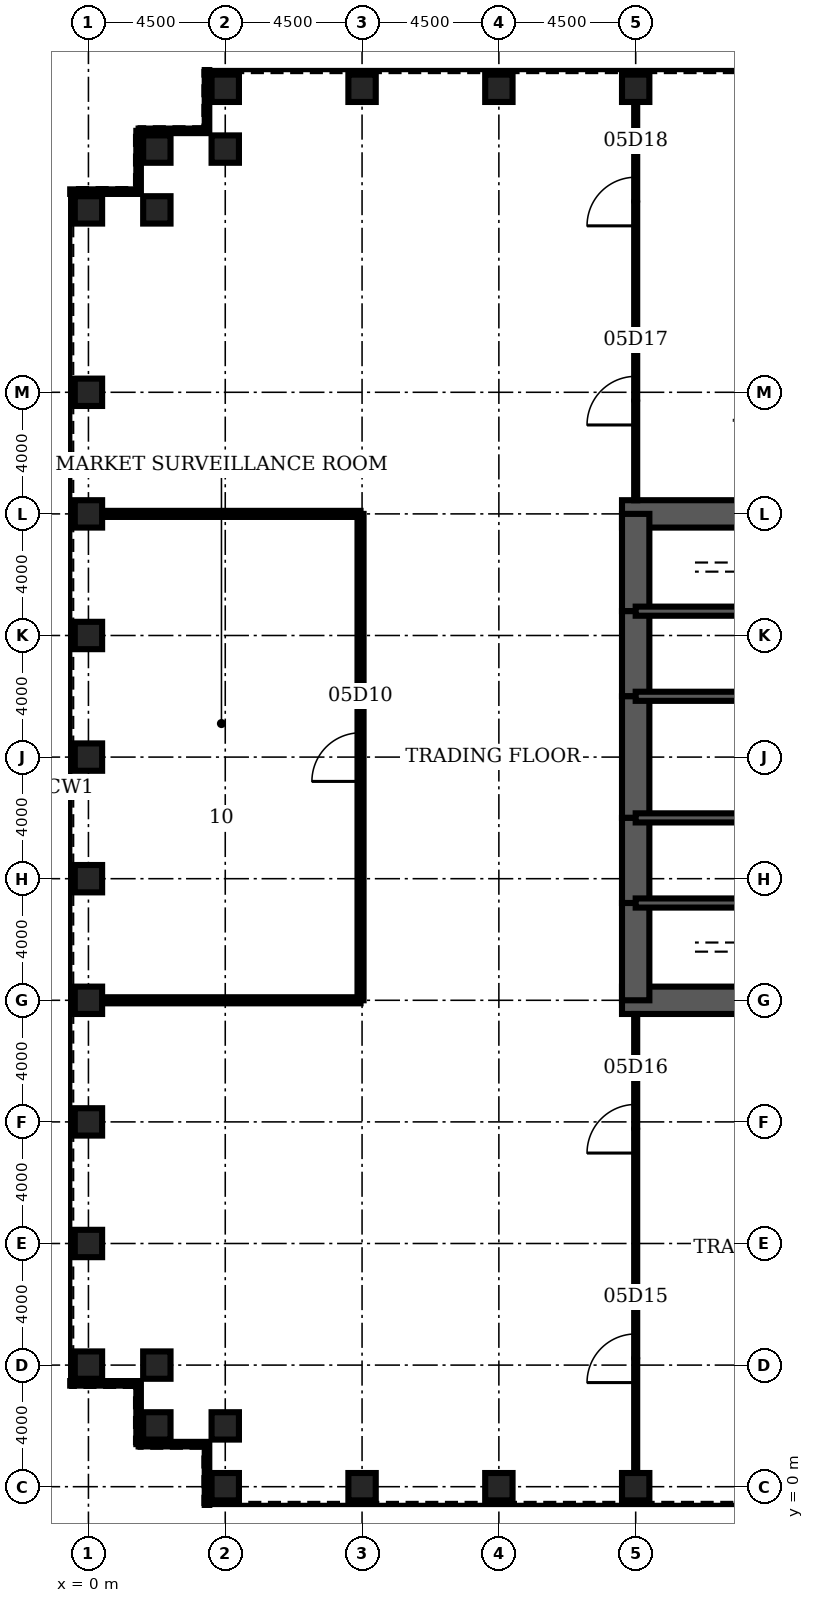
"""IFC4 building model, lengths in metres.
Left out: names, types, materials, properties, quantities, classifications, styles, units other than length and angle.
Written with IfcOpenShell. Run it as: python <this file> out.ifc"""

import sys

from ifc_helpers import new_model, si_unit, direction, frame, frame_2d, origin, origin_2d, place, context, subcontext, project, spatial, rectangle, hollow_rectangle, extrude, element, fill, save


model = new_model("IFC4")
c1 = context("Model", 3, precision=1e-05, world=origin(), true_north=direction((0.0, 1.0)))
c2 = subcontext(c1, "Body", "Model", "MODEL_VIEW")
j1 = project(units=[si_unit("LENGTHUNIT", "METRE"), si_unit("PLANEANGLEUNIT", "RADIAN")], contexts=[c1])
p1 = place(None, origin())
s1 = spatial("IfcSite", under=j1, at=p1, CompositionType="ELEMENT")
p2 = place(p1, origin())
s2 = spatial("IfcBuilding", under=s1, at=p2, CompositionType="ELEMENT")
p3 = place(p2, frame((0.0, 0.0, 27.5)))
s3 = spatial("IfcBuildingStorey", under=s2, at=p3, CompositionType="ELEMENT", Elevation=27.5)
for number, where, z_axis, x_axis in (
    (1, (4.5, 0.0, 0.0), (0.0, 0.0, 1.0), (0.0, 1.0, 0.0)),
    (2, (9.0, 0.0, 0.0), (0.0, 0.0, 1.0), (0.0, 1.0, 0.0)),
    (3, (13.5, 0.0, 0.0), (0.0, 0.0, 1.0), (0.0, 1.0, 0.0)),
    (4, (18.0, 0.0, 0.0), (0.0, 0.0, 1.0), (0.0, 1.0, 0.0)),
    (5, (18.0, 46.0, 0.0), (0.0, 0.0, 1.0), (0.0, 1.0, 0.0)),
    (6, (13.5, 46.0, 0.0), (0.0, 0.0, 1.0), (0.0, 1.0, 0.0)),
    (7, (9.0, 46.0, 0.0), (0.0, 0.0, 1.0), (0.0, 1.0, 0.0)),
    (8, (4.5, 46.0, 0.0), (0.0, 0.0, 1.0), (0.0, 1.0, 0.0)),
    (9, (4.5, 44.0, 0.0), (0.0, 0.0, 1.0), (0.0, 1.0, 0.0)),
    (10, (2.25, 44.0, 0.0), (0.0, 0.0, 1.0), (1.0, 0.0, 0.0)),
    (11, (2.25, 42.0, 0.0), (0.0, 0.0, 1.0), (1.0, 0.0, 0.0)),
    (12, (0.0, 42.0, 0.0), (0.0, 0.0, 1.0), (1.0, 0.0, 0.0)),
    (13, (0.0, 36.0, 0.0), (0.0, 0.0, 1.0), (1.0, 0.0, 0.0)),
    (14, (0.0, 32.0, 0.0), (0.0, 0.0, 1.0), (1.0, 0.0, 0.0)),
    (15, (0.0, 28.0, 0.0), (0.0, 0.0, 1.0), (1.0, 0.0, 0.0)),
    (16, (0.0, 24.0, 0.0), (0.0, 0.0, 1.0), (1.0, 0.0, 0.0)),
    (17, (0.0, 20.0, 0.0), (0.0, 0.0, 1.0), (1.0, 0.0, 0.0)),
    (18, (0.0, 16.0, 0.0), (0.0, 0.0, 1.0), (1.0, 0.0, 0.0)),
    (19, (0.0, 12.0, 0.0), (0.0, 0.0, 1.0), (1.0, 0.0, 0.0)),
    (20, (0.0, 8.0, 0.0), (0.0, 0.0, 1.0), (1.0, 0.0, 0.0)),
    (21, (0.0, 4.0, 0.0), (0.0, 0.0, 1.0), (1.0, 0.0, 0.0)),
    (22, (2.25, 4.0, 0.0), (0.0, 0.0, 1.0), (1.0, 0.0, 0.0)),
    (23, (2.25, 2.0, 0.0), (0.0, 0.0, 1.0), (1.0, 0.0, 0.0)),
    (24, (4.5, 2.0, 0.0), (0.0, 0.0, 1.0), (0.0, 1.0, 0.0)),
):
    element("IfcColumn", number, at=place(p3, frame(where, z_axis=z_axis, x_axis=x_axis)), inside=s3, PredefinedType="COLUMN", context=c2, shape_type="SweptSolid", body=[
        extrude(hollow_rectangle(XDim=0.9, YDim=0.9, WallThickness=0.12, at=origin_2d()), origin(), (0.0, 0.0, 1.0), 4.5),
    ])
for number, where, z_axis, x_axis in (
    (25, (17.55, 16.0, 0.0), (0.0, 0.0, 1.0), (1.0, 0.0, 0.0)),
    (26, (27.0, 32.0, 0.0), (0.0, 0.0, 1.0), (-1.0, 0.0, 0.0)),
):
    element("IfcWall", number, at=place(p3, frame(where, z_axis=z_axis, x_axis=x_axis)), inside=s3, PredefinedType="SHEAR", context=c2, shape_type="SweptSolid", body=[
        extrude(rectangle(XDim=9.45, YDim=0.9, at=frame_2d((4.725, 0.0))), origin(), (0.0, 0.0, 1.0), 4.5),
    ])
p4 = place(p3, frame((18.0, 32.0, 0.0), z_axis=(0.0, 0.0, 1.0), x_axis=(0.0, -1.0, 0.0)))
e27 = element("IfcWall", 27, at=p4, inside=s3, PredefinedType="SHEAR", context=c2, shape_type="SweptSolid", body=[
    extrude(rectangle(XDim=3.2, YDim=0.9, at=frame_2d((1.6, 0.0))), origin(), (0.0, 0.0, 1.0), 4.5),
])
p5 = place(p3, frame((18.0, 28.8, 0.0), z_axis=(0.0, 0.0, 1.0), x_axis=(0.0, -1.0, 0.0)))
e28 = element("IfcWall", 28, at=p5, inside=s3, PredefinedType="SHEAR", context=c2, shape_type="SweptSolid", body=[
    extrude(rectangle(XDim=2.8, YDim=0.9, at=frame_2d((1.4, 0.0))), origin(), (0.0, 0.0, 1.0), 4.5),
])
p6 = place(p5, frame((0.4, 0.0, 0.0)))
e29 = element("IfcOpeningElement", 29, at=p6, cuts=e28, PredefinedType="OPENING", context=c2, shape_type="SweptSolid", body=[
    extrude(rectangle(XDim=1.8, YDim=2.1, at=frame_2d((0.9, 1.05))), frame((0.0, 0.46, 0.0), z_axis=(0.0, -1.0, 0.0), x_axis=(1.0, 0.0, 0.0)), (0.0, 0.0, 1.0), 0.92),
])
p7 = place(p3, frame((18.0, 26.0, 0.0), z_axis=(0.0, 0.0, 1.0), x_axis=(0.0, -1.0, 0.0)))
e30 = element("IfcWall", 30, at=p7, inside=s3, PredefinedType="SHEAR", context=c2, shape_type="SweptSolid", body=[
    extrude(rectangle(XDim=4.0, YDim=0.9, at=frame_2d((2.0, 0.0))), origin(), (0.0, 0.0, 1.0), 4.5),
])
p8 = place(p3, frame((18.0, 22.0, 0.0), z_axis=(0.0, 0.0, 1.0), x_axis=(0.0, -1.0, 0.0)))
e31 = element("IfcWall", 31, at=p8, inside=s3, PredefinedType="SHEAR", context=c2, shape_type="SweptSolid", body=[
    extrude(rectangle(XDim=2.8, YDim=0.9, at=frame_2d((1.4, 0.0))), origin(), (0.0, 0.0, 1.0), 4.5),
])
p9 = place(p8, frame((0.6, 0.0, 0.0)))
e32 = element("IfcOpeningElement", 32, at=p9, cuts=e31, PredefinedType="OPENING", context=c2, shape_type="SweptSolid", body=[
    extrude(rectangle(XDim=1.8, YDim=2.1, at=frame_2d((0.9, 1.05))), frame((0.0, 0.46, 0.0), z_axis=(0.0, -1.0, 0.0), x_axis=(1.0, 0.0, 0.0)), (0.0, 0.0, 1.0), 0.92),
])
p10 = place(p3, frame((18.0, 19.2, 0.0), z_axis=(0.0, 0.0, 1.0), x_axis=(0.0, -1.0, 0.0)))
e33 = element("IfcWall", 33, at=p10, inside=s3, PredefinedType="SHEAR", context=c2, shape_type="SweptSolid", body=[
    extrude(rectangle(XDim=3.2, YDim=0.9, at=frame_2d((1.6, 0.0))), origin(), (0.0, 0.0, 1.0), 4.5),
])
p11 = place(p3, frame((18.0, 19.2, 0.0), z_axis=(0.0, 0.0, 1.0), x_axis=(1.0, 0.0, 0.0)))
e34 = element("IfcWall", 34, at=p11, inside=s3, PredefinedType="SOLIDWALL", context=c2, shape_type="SweptSolid", body=[
    extrude(rectangle(XDim=9.0, YDim=0.3, at=frame_2d((4.5, 0.0))), origin(), (0.0, 0.0, 1.0), 4.5),
])
p12 = place(p11, frame((0.65, 0.0, 0.0)))
e35 = element("IfcOpeningElement", 35, at=p12, cuts=e34, PredefinedType="OPENING", context=c2, shape_type="SweptSolid", body=[
    extrude(rectangle(XDim=1.0, YDim=2.1, at=frame_2d((0.5, 1.05))), frame((0.0, 0.16, 0.0), z_axis=(0.0, -1.0, 0.0), x_axis=(1.0, 0.0, 0.0)), (0.0, 0.0, 1.0), 0.32),
])
p13 = place(p3, frame((18.0, 28.8, 0.0), z_axis=(0.0, 0.0, 1.0), x_axis=(1.0, 0.0, 0.0)))
e36 = element("IfcWall", 36, at=p13, inside=s3, PredefinedType="SOLIDWALL", context=c2, shape_type="SweptSolid", body=[
    extrude(rectangle(XDim=9.0, YDim=0.3, at=frame_2d((4.5, 0.0))), origin(), (0.0, 0.0, 1.0), 4.5),
])
p14 = place(p13, frame((0.65, 0.0, 0.0)))
e37 = element("IfcOpeningElement", 37, at=p14, cuts=e36, PredefinedType="OPENING", context=c2, shape_type="SweptSolid", body=[
    extrude(rectangle(XDim=1.0, YDim=2.1, at=frame_2d((0.5, 1.05))), frame((0.0, 0.16, 0.0), z_axis=(0.0, -1.0, 0.0), x_axis=(1.0, 0.0, 0.0)), (0.0, 0.0, 1.0), 0.32),
])
p15 = place(p3, frame((18.0, 22.0, 0.0), z_axis=(0.0, 0.0, 1.0), x_axis=(1.0, 0.0, 0.0)))
e38 = element("IfcWall", 38, at=p15, inside=s3, PredefinedType="SOLIDWALL", context=c2, shape_type="SweptSolid", body=[
    extrude(rectangle(XDim=6.0, YDim=0.3, at=frame_2d((3.0, 0.0))), origin(), (0.0, 0.0, 1.0), 4.5),
])
p16 = place(p15, frame((4.4, 0.0, 0.0)))
e39 = element("IfcOpeningElement", 39, at=p16, cuts=e38, PredefinedType="OPENING", context=c2, shape_type="SweptSolid", body=[
    extrude(rectangle(XDim=1.0, YDim=2.1, at=frame_2d((0.5, 1.05))), frame((0.0, 0.16, 0.0), z_axis=(0.0, -1.0, 0.0), x_axis=(1.0, 0.0, 0.0)), (0.0, 0.0, 1.0), 0.32),
])
p17 = place(p15, frame((0.85, 0.0, 0.0)))
e40 = element("IfcOpeningElement", 40, at=p17, cuts=e38, PredefinedType="OPENING", context=c2, shape_type="SweptSolid", body=[
    extrude(rectangle(XDim=1.0, YDim=2.1, at=frame_2d((0.5, 1.05))), frame((0.0, 0.16, 0.0), z_axis=(0.0, -1.0, 0.0), x_axis=(1.0, 0.0, 0.0)), (0.0, 0.0, 1.0), 0.32),
])
p18 = place(p3, frame((18.0, 26.0, 0.0), z_axis=(0.0, 0.0, 1.0), x_axis=(1.0, 0.0, 0.0)))
e41 = element("IfcWall", 41, at=p18, inside=s3, PredefinedType="SOLIDWALL", context=c2, shape_type="SweptSolid", body=[
    extrude(rectangle(XDim=6.0, YDim=0.3, at=frame_2d((3.0, 0.0))), origin(), (0.0, 0.0, 1.0), 4.5),
])
p19 = place(p3, frame((20.325, 22.15, 0.0), z_axis=(0.0, 0.0, 1.0), x_axis=(0.0, 1.0, 0.0)))
e42 = element("IfcWall", 42, at=p19, inside=s3, PredefinedType="PARTITIONING", context=c2, shape_type="SweptSolid", body=[
    extrude(rectangle(XDim=3.7, YDim=0.15, at=frame_2d((1.85, 0.0))), origin(), (0.0, 0.0, 1.0), 3.0),
])
for number, where, z_axis, x_axis in (
    (43, (0.45, 16.0, 0.0), (0.0, 0.0, 1.0), (1.0, 0.0, 0.0)),
    (44, (0.45, 32.0, 0.0), (0.0, 0.0, 1.0), (1.0, 0.0, 0.0)),
):
    element("IfcWall", number, at=place(p3, frame(where, z_axis=z_axis, x_axis=x_axis)), inside=s3, PredefinedType="PARTITIONING", context=c2, shape_type="SweptSolid", body=[
        extrude(rectangle(XDim=8.5, YDim=0.2, at=frame_2d((4.25, 0.0))), origin(), (0.0, 0.0, 1.0), 3.0),
    ])
p20 = place(p3, frame((8.95, 16.0, 0.0), z_axis=(0.0, 0.0, 1.0), x_axis=(0.0, 1.0, 0.0)))
e45 = element("IfcWall", 45, at=p20, inside=s3, PredefinedType="PARTITIONING", context=c2, shape_type="SweptSolid", body=[
    extrude(rectangle(XDim=16.0, YDim=0.2, at=frame_2d((8.0, 0.0))), origin(), (0.0, 0.0, 1.0), 3.0),
])
p21 = place(p20, frame((7.2, 0.0, 0.0)))
e46 = element("IfcOpeningElement", 46, at=p21, cuts=e45, PredefinedType="OPENING", context=c2, shape_type="SweptSolid", body=[
    extrude(rectangle(XDim=1.6, YDim=2.1, at=frame_2d((0.8, 1.05))), frame((0.0, 0.11, 0.0), z_axis=(0.0, -1.0, 0.0), x_axis=(1.0, 0.0, 0.0)), (0.0, 0.0, 1.0), 0.22),
])
p22 = place(p3, frame((18.0, 0.45, 0.0), z_axis=(0.0, 0.0, 1.0), x_axis=(0.0, 1.0, 0.0)))
e47 = element("IfcWall", 47, at=p22, inside=s3, PredefinedType="PARTITIONING", context=c2, shape_type="SweptSolid", body=[
    extrude(rectangle(XDim=15.1, YDim=0.1, at=frame_2d((7.55, 0.0))), origin(), (0.0, 0.0, 1.0), 3.0),
])
p23 = place(p22, frame((2.975, 0.0, 0.0)))
e48 = element("IfcOpeningElement", 48, at=p23, cuts=e47, PredefinedType="OPENING", context=c2, shape_type="SweptSolid", body=[
    extrude(rectangle(XDim=1.6, YDim=2.1, at=frame_2d((0.8, 1.05))), frame((0.0, 0.06, 0.0), z_axis=(0.0, -1.0, 0.0), x_axis=(1.0, 0.0, 0.0)), (0.0, 0.0, 1.0), 0.12),
])
p24 = place(p22, frame((10.525, 0.0, 0.0)))
e49 = element("IfcOpeningElement", 49, at=p24, cuts=e47, PredefinedType="OPENING", context=c2, shape_type="SweptSolid", body=[
    extrude(rectangle(XDim=1.6, YDim=2.1, at=frame_2d((0.8, 1.05))), frame((0.0, 0.06, 0.0), z_axis=(0.0, -1.0, 0.0), x_axis=(1.0, 0.0, 0.0)), (0.0, 0.0, 1.0), 0.12),
])
p25 = place(p3, frame((18.0, 32.45, 0.0), z_axis=(0.0, 0.0, 1.0), x_axis=(0.0, 1.0, 0.0)))
e50 = element("IfcWall", 50, at=p25, inside=s3, PredefinedType="PARTITIONING", context=c2, shape_type="SweptSolid", body=[
    extrude(rectangle(XDim=13.1, YDim=0.1, at=frame_2d((6.55, 0.0))), origin(), (0.0, 0.0, 1.0), 3.0),
])
p26 = place(p25, frame((2.475, 0.0, 0.0)))
e51 = element("IfcOpeningElement", 51, at=p26, cuts=e50, PredefinedType="OPENING", context=c2, shape_type="SweptSolid", body=[
    extrude(rectangle(XDim=1.6, YDim=2.1, at=frame_2d((0.8, 1.05))), frame((0.0, 0.06, 0.0), z_axis=(0.0, -1.0, 0.0), x_axis=(1.0, 0.0, 0.0)), (0.0, 0.0, 1.0), 0.12),
])
p27 = place(p25, frame((9.025, 0.0, 0.0)))
e52 = element("IfcOpeningElement", 52, at=p27, cuts=e50, PredefinedType="OPENING", context=c2, shape_type="SweptSolid", body=[
    extrude(rectangle(XDim=1.6, YDim=2.1, at=frame_2d((0.8, 1.05))), frame((0.0, 0.06, 0.0), z_axis=(0.0, -1.0, 0.0), x_axis=(1.0, 0.0, 0.0)), (0.0, 0.0, 1.0), 0.12),
])
p28 = place(p3, frame((3.9, 46.6, 0.0), z_axis=(0.0, 0.0, 1.0), x_axis=(0.0, -1.0, 0.0)))
e53 = element("IfcWall", 53, at=p28, inside=s3, PredefinedType="ELEMENTEDWALL", context=c2, shape_type="SweptSolid", body=[
    extrude(rectangle(XDim=2.0, YDim=0.15, at=frame_2d((1.0, 0.0))), origin(), (0.0, 0.0, 1.0), 4.32),
])
p29 = place(p3, frame((3.9, 44.6, 0.0), z_axis=(0.0, 0.0, 1.0), x_axis=(-1.0, 0.0, 0.0)))
e54 = element("IfcWall", 54, at=p29, inside=s3, PredefinedType="ELEMENTEDWALL", context=c2, shape_type="SweptSolid", body=[
    extrude(rectangle(XDim=2.25, YDim=0.15, at=frame_2d((1.125, 0.0))), origin(), (0.0, 0.0, 1.0), 4.32),
])
p30 = place(p3, frame((1.65, 44.6, 0.0), z_axis=(0.0, 0.0, 1.0), x_axis=(0.0, -1.0, 0.0)))
e55 = element("IfcWall", 55, at=p30, inside=s3, PredefinedType="ELEMENTEDWALL", context=c2, shape_type="SweptSolid", body=[
    extrude(rectangle(XDim=2.0, YDim=0.15, at=frame_2d((1.0, 0.0))), origin(), (0.0, 0.0, 1.0), 4.32),
])
for number, where, z_axis, x_axis in (
    (56, (1.65, 42.6, 0.0), (0.0, 0.0, 1.0), (-1.0, 0.0, 0.0)),
    (57, (-0.6, 3.4, 0.0), (0.0, 0.0, 1.0), (1.0, 0.0, 0.0)),
):
    element("IfcWall", number, at=place(p3, frame(where, z_axis=z_axis, x_axis=x_axis)), inside=s3, PredefinedType="ELEMENTEDWALL", context=c2, shape_type="SweptSolid", body=[
        extrude(rectangle(XDim=2.25, YDim=0.15, at=frame_2d((1.125, 0.0))), origin(), (0.0, 0.0, 1.0), 4.32),
    ])
p31 = place(p3, frame((1.65, 3.4, 0.0), z_axis=(0.0, 0.0, 1.0), x_axis=(0.0, -1.0, 0.0)))
e58 = element("IfcWall", 58, at=p31, inside=s3, PredefinedType="ELEMENTEDWALL", context=c2, shape_type="SweptSolid", body=[
    extrude(rectangle(XDim=2.0, YDim=0.15, at=frame_2d((1.0, 0.0))), origin(), (0.0, 0.0, 1.0), 4.32),
])
p32 = place(p3, frame((1.65, 1.4, 0.0), z_axis=(0.0, 0.0, 1.0), x_axis=(1.0, 0.0, 0.0)))
e59 = element("IfcWall", 59, at=p32, inside=s3, PredefinedType="ELEMENTEDWALL", context=c2, shape_type="SweptSolid", body=[
    extrude(rectangle(XDim=2.25, YDim=0.15, at=frame_2d((1.125, 0.0))), origin(), (0.0, 0.0, 1.0), 4.32),
])
p33 = place(p3, frame((3.9, 1.4, 0.0), z_axis=(0.0, 0.0, 1.0), x_axis=(0.0, -1.0, 0.0)))
e60 = element("IfcWall", 60, at=p33, inside=s3, PredefinedType="ELEMENTEDWALL", context=c2, shape_type="SweptSolid", body=[
    extrude(rectangle(XDim=2.0, YDim=0.15, at=frame_2d((1.0, 0.0))), origin(), (0.0, 0.0, 1.0), 4.32),
])
p34 = place(p21, origin())
e61 = element("IfcDoor", 61, at=p34, inside=s3, OperationType="SINGLE_SWING_LEFT", PredefinedType="DOOR", context=c2, shape_type="SweptSolid", body=[
    extrude(rectangle(XDim=1.6, YDim=2.1, at=frame_2d((0.8, 1.05))), frame((0.0, 0.025, 0.0), z_axis=(0.0, -1.0, 0.0), x_axis=(1.0, 0.0, 0.0)), (0.0, 0.0, 1.0), 0.05),
])
fill(e46, e61)
p35 = place(p23, origin())
e62 = element("IfcDoor", 62, at=p35, inside=s3, OperationType="SINGLE_SWING_LEFT", PredefinedType="DOOR", context=c2, shape_type="SweptSolid", body=[
    extrude(rectangle(XDim=1.6, YDim=2.1, at=frame_2d((0.8, 1.05))), frame((0.0, 0.025, 0.0), z_axis=(0.0, -1.0, 0.0), x_axis=(1.0, 0.0, 0.0)), (0.0, 0.0, 1.0), 0.05),
])
fill(e48, e62)
p36 = place(p24, origin())
e63 = element("IfcDoor", 63, at=p36, inside=s3, OperationType="SINGLE_SWING_LEFT", PredefinedType="DOOR", context=c2, shape_type="SweptSolid", body=[
    extrude(rectangle(XDim=1.6, YDim=2.1, at=frame_2d((0.8, 1.05))), frame((0.0, 0.025, 0.0), z_axis=(0.0, -1.0, 0.0), x_axis=(1.0, 0.0, 0.0)), (0.0, 0.0, 1.0), 0.05),
])
fill(e49, e63)
p37 = place(p26, origin())
e64 = element("IfcDoor", 64, at=p37, inside=s3, OperationType="SINGLE_SWING_LEFT", PredefinedType="DOOR", context=c2, shape_type="SweptSolid", body=[
    extrude(rectangle(XDim=1.6, YDim=2.1, at=frame_2d((0.8, 1.05))), frame((0.0, 0.025, 0.0), z_axis=(0.0, -1.0, 0.0), x_axis=(1.0, 0.0, 0.0)), (0.0, 0.0, 1.0), 0.05),
])
fill(e51, e64)
p38 = place(p27, origin())
e65 = element("IfcDoor", 65, at=p38, inside=s3, OperationType="SINGLE_SWING_LEFT", PredefinedType="DOOR", context=c2, shape_type="SweptSolid", body=[
    extrude(rectangle(XDim=1.6, YDim=2.1, at=frame_2d((0.8, 1.05))), frame((0.0, 0.025, 0.0), z_axis=(0.0, -1.0, 0.0), x_axis=(1.0, 0.0, 0.0)), (0.0, 0.0, 1.0), 0.05),
])
fill(e52, e65)
p39 = place(p12, origin())
e66 = element("IfcDoor", 66, at=p39, inside=s3, OperationType="SINGLE_SWING_LEFT", PredefinedType="DOOR", context=c2, shape_type="SweptSolid", body=[
    extrude(rectangle(XDim=1.0, YDim=2.1, at=frame_2d((0.5, 1.05))), frame((0.0, 0.025, 0.0), z_axis=(0.0, -1.0, 0.0), x_axis=(1.0, 0.0, 0.0)), (0.0, 0.0, 1.0), 0.05),
])
fill(e35, e66)
p40 = place(p14, origin())
e67 = element("IfcDoor", 67, at=p40, inside=s3, OperationType="SINGLE_SWING_LEFT", PredefinedType="DOOR", context=c2, shape_type="SweptSolid", body=[
    extrude(rectangle(XDim=1.0, YDim=2.1, at=frame_2d((0.5, 1.05))), frame((0.0, 0.025, 0.0), z_axis=(0.0, -1.0, 0.0), x_axis=(1.0, 0.0, 0.0)), (0.0, 0.0, 1.0), 0.05),
])
fill(e37, e67)
p41 = place(p9, origin())
e68 = element("IfcDoor", 68, at=p41, inside=s3, OperationType="SINGLE_SWING_LEFT", PredefinedType="DOOR", context=c2, shape_type="SweptSolid", body=[
    extrude(rectangle(XDim=1.8, YDim=2.1, at=frame_2d((0.9, 1.05))), frame((0.0, 0.45, 0.0), z_axis=(0.0, -1.0, 0.0), x_axis=(1.0, 0.0, 0.0)), (0.0, 0.0, 1.0), 0.899),
])
fill(e32, e68)
p42 = place(p6, origin())
e69 = element("IfcDoor", 69, at=p42, inside=s3, OperationType="SINGLE_SWING_LEFT", PredefinedType="DOOR", context=c2, shape_type="SweptSolid", body=[
    extrude(rectangle(XDim=1.8, YDim=2.1, at=frame_2d((0.9, 1.05))), frame((0.0, 0.45, 0.0), z_axis=(0.0, -1.0, 0.0), x_axis=(1.0, 0.0, 0.0)), (0.0, 0.0, 1.0), 0.899),
])
fill(e29, e69)
p43 = place(p17, origin())
e70 = element("IfcDoor", 70, at=p43, inside=s3, OperationType="SINGLE_SWING_LEFT", PredefinedType="DOOR", context=c2, shape_type="SweptSolid", body=[
    extrude(rectangle(XDim=1.0, YDim=2.1, at=frame_2d((0.5, 1.05))), frame((0.0, 0.025, 0.0), z_axis=(0.0, -1.0, 0.0), x_axis=(1.0, 0.0, 0.0)), (0.0, 0.0, 1.0), 0.05),
])
fill(e40, e70)
save(model, sys.argv[1])
